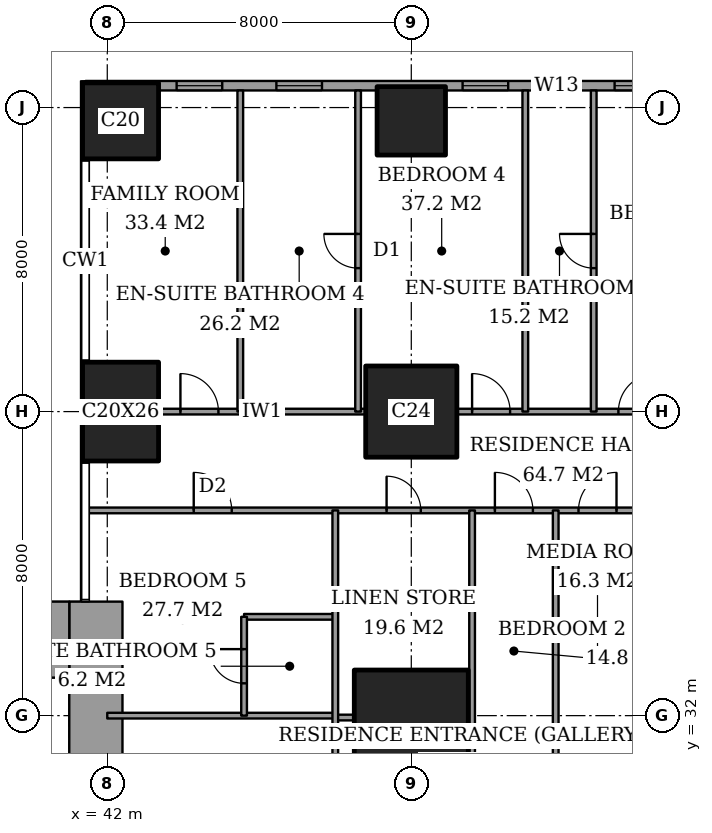
"""IFC4 building model, lengths in metres.
Left out: names, types, materials, properties, quantities, classifications, styles, units other than length and angle.
Written with IfcOpenShell. Run it as: python <this file> out.ifc"""

import sys

from ifc_helpers import new_model, si_unit, direction, frame, frame_2d, origin, origin_2d, place, context, subcontext, project, spatial, rectangle, extrude, element, fill, save


model = new_model("IFC4")
c1 = context("Model", 3, precision=1e-05, world=origin(), true_north=direction((0.0, 1.0)))
c2 = subcontext(c1, "Body", "Model", "MODEL_VIEW")
j1 = project(units=[si_unit("LENGTHUNIT", "METRE"), si_unit("PLANEANGLEUNIT", "RADIAN")], contexts=[c1])
p1 = place(None, origin())
s1 = spatial("IfcSite", under=j1, at=p1, CompositionType="ELEMENT")
p2 = place(p1, origin())
s2 = spatial("IfcBuilding", under=s1, at=p2, CompositionType="ELEMENT")
p3 = place(p2, frame((0.0, 0.0, 218.2)))
s3 = spatial("IfcBuildingStorey", under=s2, at=p3, CompositionType="ELEMENT", Elevation=218.2)
p4 = place(p3, frame((42.35, 40.0, 0.0), z_axis=(0.0, 0.0, 1.0), x_axis=(1.0, 0.0, 0.0)))
e1 = element("IfcColumn", 1, at=p4, inside=s3, PredefinedType="COLUMN", context=c2, shape_type="SweptSolid", body=[
    extrude(rectangle(XDim=2.0, YDim=2.6, at=origin_2d()), origin(), (0.0, 0.0, 1.0), 3.6),
])
p5 = place(p3, frame((42.35, 47.65, 0.0), z_axis=(0.0, 0.0, 1.0), x_axis=(1.0, 0.0, 0.0)))
e2 = element("IfcColumn", 2, at=p5, inside=s3, PredefinedType="COLUMN", context=c2, shape_type="SweptSolid", body=[
    extrude(rectangle(XDim=2.0, YDim=2.0, at=origin_2d()), origin(), (0.0, 0.0, 1.0), 3.6),
])
p6 = place(p3, frame((50.0, 32.0, 0.0), z_axis=(0.0, 0.0, 1.0), x_axis=(1.0, 0.0, 0.0)))
e3 = element("IfcColumn", 3, at=p6, inside=s3, PredefinedType="COLUMN", context=c2, shape_type="SweptSolid", body=[
    extrude(rectangle(XDim=3.0, YDim=2.4, at=origin_2d()), origin(), (0.0, 0.0, 1.0), 3.6),
])
p7 = place(p3, frame((50.0, 40.0, 0.0), z_axis=(0.0, 0.0, 1.0), x_axis=(1.0, 0.0, 0.0)))
e4 = element("IfcColumn", 4, at=p7, inside=s3, PredefinedType="COLUMN", context=c2, shape_type="SweptSolid", body=[
    extrude(rectangle(XDim=2.4, YDim=2.4, at=origin_2d()), origin(), (0.0, 0.0, 1.0), 3.6),
])
p8 = place(p3, frame((50.0, 47.65, 0.0), z_axis=(0.0, 0.0, 1.0), x_axis=(1.0, 0.0, 0.0)))
e5 = element("IfcColumn", 5, at=p8, inside=s3, PredefinedType="COLUMN", context=c2, shape_type="SweptSolid", body=[
    extrude(rectangle(XDim=1.8, YDim=1.8, at=origin_2d()), origin(), (0.0, 0.0, 1.0), 3.6),
])
p9 = place(p3, frame((37.85, 34.0, 0.0), z_axis=(0.0, 0.0, 1.0), x_axis=(1.0, 0.0, 0.0)))
e6 = element("IfcWall", 6, at=p9, inside=s3, PredefinedType="SHEAR", context=c2, shape_type="SweptSolid", body=[
    extrude(rectangle(XDim=3.15, YDim=2.0, at=frame_2d((1.575, 0.0))), origin(), (0.0, 0.0, 1.0), 3.6),
])
p10 = place(p3, frame((41.7, 24.85, 0.0), z_axis=(0.0, 0.0, 1.0), x_axis=(0.0, 1.0, 0.0)))
e7 = element("IfcWall", 7, at=p10, inside=s3, PredefinedType="SHEAR", context=c2, shape_type="SweptSolid", body=[
    extrude(rectangle(XDim=10.15, YDim=1.4, at=frame_2d((5.075, 0.0))), origin(), (0.0, 0.0, 1.0), 3.6),
])
p11 = place(p3, frame((62.825, 48.575, 0.0), z_axis=(0.0, 0.0, 1.0), x_axis=(-1.0, 0.0, 0.0)))
e8 = element("IfcWall", 8, at=p11, inside=s3, PredefinedType="SOLIDWALL", context=c2, shape_type="SweptSolid", body=[
    extrude(rectangle(XDim=21.4, YDim=0.25, at=frame_2d((10.7, 0.0))), origin(), (0.0, 0.0, 1.0), 3.6),
])
p12 = place(p11, frame((0.55, 0.0, 0.2)))
e9 = element("IfcOpeningElement", 9, at=p12, cuts=e8, PredefinedType="OPENING", context=c2, shape_type="SweptSolid", body=[
    extrude(rectangle(XDim=1.2, YDim=2.4, at=frame_2d((0.6, 1.2))), frame((0.0, 0.135, 0.0), z_axis=(0.0, -1.0, 0.0), x_axis=(1.0, 0.0, 0.0)), (0.0, 0.0, 1.0), 0.27),
])
p13 = place(p11, frame((2.475, 0.0, 0.2)))
e10 = element("IfcOpeningElement", 10, at=p13, cuts=e8, PredefinedType="OPENING", context=c2, shape_type="SweptSolid", body=[
    extrude(rectangle(XDim=1.2, YDim=2.4, at=frame_2d((0.6, 1.2))), frame((0.0, 0.135, 0.0), z_axis=(0.0, -1.0, 0.0), x_axis=(1.0, 0.0, 0.0)), (0.0, 0.0, 1.0), 0.27),
])
p14 = place(p11, frame((6.275, 0.0, 0.2)))
e11 = element("IfcOpeningElement", 11, at=p14, cuts=e8, PredefinedType="OPENING", context=c2, shape_type="SweptSolid", body=[
    extrude(rectangle(XDim=1.2, YDim=2.4, at=frame_2d((0.6, 1.2))), frame((0.0, 0.135, 0.0), z_axis=(0.0, -1.0, 0.0), x_axis=(1.0, 0.0, 0.0)), (0.0, 0.0, 1.0), 0.27),
])
p15 = place(p11, frame((8.4, 0.0, 0.2)))
e12 = element("IfcOpeningElement", 12, at=p15, cuts=e8, PredefinedType="OPENING", context=c2, shape_type="SweptSolid", body=[
    extrude(rectangle(XDim=1.2, YDim=2.4, at=frame_2d((0.6, 1.2))), frame((0.0, 0.135, 0.0), z_axis=(0.0, -1.0, 0.0), x_axis=(1.0, 0.0, 0.0)), (0.0, 0.0, 1.0), 0.27),
])
p16 = place(p11, frame((10.275, 0.0, 0.2)))
e13 = element("IfcOpeningElement", 13, at=p16, cuts=e8, PredefinedType="OPENING", context=c2, shape_type="SweptSolid", body=[
    extrude(rectangle(XDim=1.2, YDim=2.4, at=frame_2d((0.6, 1.2))), frame((0.0, 0.135, 0.0), z_axis=(0.0, -1.0, 0.0), x_axis=(1.0, 0.0, 0.0)), (0.0, 0.0, 1.0), 0.27),
])
p17 = place(p11, frame((15.175, 0.0, 0.2)))
e14 = element("IfcOpeningElement", 14, at=p17, cuts=e8, PredefinedType="OPENING", context=c2, shape_type="SweptSolid", body=[
    extrude(rectangle(XDim=1.2, YDim=2.4, at=frame_2d((0.6, 1.2))), frame((0.0, 0.135, 0.0), z_axis=(0.0, -1.0, 0.0), x_axis=(1.0, 0.0, 0.0)), (0.0, 0.0, 1.0), 0.27),
])
p18 = place(p11, frame((17.8, 0.0, 0.2)))
e15 = element("IfcOpeningElement", 15, at=p18, cuts=e8, PredefinedType="OPENING", context=c2, shape_type="SweptSolid", body=[
    extrude(rectangle(XDim=1.2, YDim=2.4, at=frame_2d((0.6, 1.2))), frame((0.0, 0.135, 0.0), z_axis=(0.0, -1.0, 0.0), x_axis=(1.0, 0.0, 0.0)), (0.0, 0.0, 1.0), 0.27),
])
p19 = place(p3, frame((48.0, 31.95, 0.0), z_axis=(0.0, 0.0, 1.0), x_axis=(1.0, 0.0, 0.0)))
e16 = element("IfcWall", 16, at=p19, inside=s3, PredefinedType="PARTITIONING", context=c2, shape_type="SweptSolid", body=[
    extrude(rectangle(XDim=0.5, YDim=0.15, at=frame_2d((0.25, 0.0))), origin(), (0.0, 0.0, 1.0), 2.634),
])
p20 = place(p3, frame((42.0, 32.0, 0.0), z_axis=(0.0, 0.0, 1.0), x_axis=(1.0, 0.0, 0.0)))
e17 = element("IfcWall", 17, at=p20, inside=s3, PredefinedType="PARTITIONING", context=c2, shape_type="SweptSolid", body=[
    extrude(rectangle(XDim=6.0, YDim=0.15, at=frame_2d((3.0, 0.0))), origin(), (0.0, 0.0, 1.0), 2.634),
])
p21 = place(p3, frame((45.6, 34.6, 0.0), z_axis=(0.0, 0.0, 1.0), x_axis=(1.0, 0.0, 0.0)))
e18 = element("IfcWall", 18, at=p21, inside=s3, PredefinedType="PARTITIONING", context=c2, shape_type="SweptSolid", body=[
    extrude(rectangle(XDim=2.4, YDim=0.15, at=frame_2d((1.2, 0.0))), origin(), (0.0, 0.0, 1.0), 3.35),
])
p22 = place(p3, frame((41.439, 37.4, 0.0), z_axis=(0.0, 0.0, 1.0), x_axis=(1.0, 0.0, 0.0)))
e19 = element("IfcWall", 19, at=p22, inside=s3, PredefinedType="PARTITIONING", context=c2, shape_type="SweptSolid", body=[
    extrude(rectangle(XDim=25.011, YDim=0.15, at=frame_2d((12.505, 0.0))), origin(), (0.0, 0.0, 1.0), 3.35),
])
p23 = place(p22, frame((10.761, 0.0, 0.0)))
e20 = element("IfcOpeningElement", 20, at=p23, cuts=e19, PredefinedType="OPENING", context=c2, shape_type="SweptSolid", body=[
    extrude(rectangle(XDim=1.0, YDim=2.1, at=frame_2d((0.5, 1.05))), frame((0.0, 0.085, 0.0), z_axis=(0.0, -1.0, 0.0), x_axis=(1.0, 0.0, 0.0)), (0.0, 0.0, 1.0), 0.17),
])
p24 = place(p22, frame((20.924, 0.0, 0.0)))
e21 = element("IfcOpeningElement", 21, at=p24, cuts=e19, PredefinedType="OPENING", context=c2, shape_type="SweptSolid", body=[
    extrude(rectangle(XDim=1.0, YDim=2.1, at=frame_2d((0.5, 1.05))), frame((0.0, 0.085, 0.0), z_axis=(0.0, -1.0, 0.0), x_axis=(1.0, 0.0, 0.0)), (0.0, 0.0, 1.0), 0.17),
])
p25 = place(p22, frame((15.749, 0.0, 0.0)))
e22 = element("IfcOpeningElement", 22, at=p25, cuts=e19, PredefinedType="OPENING", context=c2, shape_type="SweptSolid", body=[
    extrude(rectangle(XDim=0.9, YDim=2.1, at=frame_2d((0.45, 1.05))), frame((0.0, 0.085, 0.0), z_axis=(0.0, -1.0, 0.0), x_axis=(1.0, 0.0, 0.0)), (0.0, 0.0, 1.0), 0.17),
])
p26 = place(p22, frame((12.961, 0.0, 0.0)))
e23 = element("IfcOpeningElement", 23, at=p26, cuts=e19, PredefinedType="OPENING", context=c2, shape_type="SweptSolid", body=[
    extrude(rectangle(XDim=1.0, YDim=2.1, at=frame_2d((0.5, 1.05))), frame((0.0, 0.085, 0.0), z_axis=(0.0, -1.0, 0.0), x_axis=(1.0, 0.0, 0.0)), (0.0, 0.0, 1.0), 0.17),
])
p27 = place(p22, frame((7.911, 0.0, 0.0)))
e24 = element("IfcOpeningElement", 24, at=p27, cuts=e19, PredefinedType="OPENING", context=c2, shape_type="SweptSolid", body=[
    extrude(rectangle(XDim=0.9, YDim=2.1, at=frame_2d((0.45, 1.05))), frame((0.0, 0.085, 0.0), z_axis=(0.0, -1.0, 0.0), x_axis=(1.0, 0.0, 0.0)), (0.0, 0.0, 1.0), 0.17),
])
p28 = place(p22, frame((2.836, 0.0, 0.0)))
e25 = element("IfcOpeningElement", 25, at=p28, cuts=e19, PredefinedType="OPENING", context=c2, shape_type="SweptSolid", body=[
    extrude(rectangle(XDim=1.0, YDim=2.1, at=frame_2d((0.5, 1.05))), frame((0.0, 0.085, 0.0), z_axis=(0.0, -1.0, 0.0), x_axis=(1.0, 0.0, 0.0)), (0.0, 0.0, 1.0), 0.17),
])
p29 = place(p3, frame((43.35, 40.0, 0.0), z_axis=(0.0, 0.0, 1.0), x_axis=(1.0, 0.0, 0.0)))
e26 = element("IfcWall", 26, at=p29, inside=s3, PredefinedType="PARTITIONING", context=c2, shape_type="SweptSolid", body=[
    extrude(rectangle(XDim=5.45, YDim=0.15, at=frame_2d((2.725, 0.0))), origin(), (0.0, 0.0, 1.0), 3.35),
])
p30 = place(p29, frame((0.575, 0.0, 0.0)))
e27 = element("IfcOpeningElement", 27, at=p30, cuts=e26, PredefinedType="OPENING", context=c2, shape_type="SweptSolid", body=[
    extrude(rectangle(XDim=1.0, YDim=2.1, at=frame_2d((0.5, 1.05))), frame((0.0, 0.085, 0.0), z_axis=(0.0, -1.0, 0.0), x_axis=(1.0, 0.0, 0.0)), (0.0, 0.0, 1.0), 0.17),
])
p31 = place(p3, frame((51.2, 40.0, 0.0), z_axis=(0.0, 0.0, 1.0), x_axis=(1.0, 0.0, 0.0)))
e28 = element("IfcWall", 28, at=p31, inside=s3, PredefinedType="PARTITIONING", context=c2, shape_type="SweptSolid", body=[
    extrude(rectangle(XDim=5.9, YDim=0.15, at=frame_2d((2.95, 0.0))), origin(), (0.0, 0.0, 1.0), 3.35),
])
p32 = place(p31, frame((4.25, 0.0, 0.0)))
e29 = element("IfcOpeningElement", 29, at=p32, cuts=e28, PredefinedType="OPENING", context=c2, shape_type="SweptSolid", body=[
    extrude(rectangle(XDim=1.0, YDim=2.1, at=frame_2d((0.5, 1.05))), frame((0.0, 0.085, 0.0), z_axis=(0.0, -1.0, 0.0), x_axis=(1.0, 0.0, 0.0)), (0.0, 0.0, 1.0), 0.17),
])
p33 = place(p31, frame((0.4, 0.0, 0.0)))
e30 = element("IfcOpeningElement", 30, at=p33, cuts=e28, PredefinedType="OPENING", context=c2, shape_type="SweptSolid", body=[
    extrude(rectangle(XDim=1.0, YDim=2.1, at=frame_2d((0.5, 1.05))), frame((0.0, 0.085, 0.0), z_axis=(0.0, -1.0, 0.0), x_axis=(1.0, 0.0, 0.0)), (0.0, 0.0, 1.0), 0.17),
])
p34 = place(p3, frame((45.5, 40.0, 0.0), z_axis=(0.0, 0.0, 1.0), x_axis=(0.0, 1.0, 0.0)))
e31 = element("IfcWall", 31, at=p34, inside=s3, PredefinedType="PARTITIONING", context=c2, shape_type="SweptSolid", body=[
    extrude(rectangle(XDim=8.45, YDim=0.15, at=frame_2d((4.225, 0.0))), origin(), (0.0, 0.0, 1.0), 3.35),
])
p35 = place(p3, frame((45.6, 32.0, 0.0), z_axis=(0.0, 0.0, 1.0), x_axis=(0.0, 1.0, 0.0)))
e32 = element("IfcWall", 32, at=p35, inside=s3, PredefinedType="PARTITIONING", context=c2, shape_type="SweptSolid", body=[
    extrude(rectangle(XDim=2.6, YDim=0.15, at=frame_2d((1.3, 0.0))), origin(), (0.0, 0.0, 1.0), 3.35),
])
p36 = place(p35, frame((0.85, 0.0, 0.0)))
e33 = element("IfcOpeningElement", 33, at=p36, cuts=e32, PredefinedType="OPENING", context=c2, shape_type="SweptSolid", body=[
    extrude(rectangle(XDim=0.9, YDim=2.1, at=frame_2d((0.45, 1.05))), frame((0.0, 0.085, 0.0), z_axis=(0.0, -1.0, 0.0), x_axis=(1.0, 0.0, 0.0)), (0.0, 0.0, 1.0), 0.17),
])
p37 = place(p3, frame((48.0, 28.0, 0.0), z_axis=(0.0, 0.0, 1.0), x_axis=(0.0, 1.0, 0.0)))
e34 = element("IfcWall", 34, at=p37, inside=s3, PredefinedType="PARTITIONING", context=c2, shape_type="SweptSolid", body=[
    extrude(rectangle(XDim=9.4, YDim=0.15, at=frame_2d((4.7, 0.0))), origin(), (0.0, 0.0, 1.0), 3.35),
])
p38 = place(p37, frame((0.5, 0.0, 0.0)))
e35 = element("IfcOpeningElement", 35, at=p38, cuts=e34, PredefinedType="OPENING", context=c2, shape_type="SweptSolid", body=[
    extrude(rectangle(XDim=1.0, YDim=2.1, at=frame_2d((0.5, 1.05))), frame((0.0, 0.085, 0.0), z_axis=(0.0, -1.0, 0.0), x_axis=(1.0, 0.0, 0.0)), (0.0, 0.0, 1.0), 0.17),
])
p39 = place(p3, frame((48.6, 40.0, 0.0), z_axis=(0.0, 0.0, 1.0), x_axis=(0.0, 1.0, 0.0)))
e36 = element("IfcWall", 36, at=p39, inside=s3, PredefinedType="PARTITIONING", context=c2, shape_type="SweptSolid", body=[
    extrude(rectangle(XDim=8.45, YDim=0.15, at=frame_2d((4.225, 0.0))), origin(), (0.0, 0.0, 1.0), 3.35),
])
p40 = place(p39, frame((3.775, 0.0, 0.0)))
e37 = element("IfcOpeningElement", 37, at=p40, cuts=e36, PredefinedType="OPENING", context=c2, shape_type="SweptSolid", body=[
    extrude(rectangle(XDim=0.9, YDim=2.1, at=frame_2d((0.45, 1.05))), frame((0.0, 0.085, 0.0), z_axis=(0.0, -1.0, 0.0), x_axis=(1.0, 0.0, 0.0)), (0.0, 0.0, 1.0), 0.17),
])
p41 = place(p3, frame((51.6, 30.0, 0.0), z_axis=(0.0, 0.0, 1.0), x_axis=(0.0, 1.0, 0.0)))
e38 = element("IfcWall", 38, at=p41, inside=s3, PredefinedType="PARTITIONING", context=c2, shape_type="SweptSolid", body=[
    extrude(rectangle(XDim=7.4, YDim=0.15, at=frame_2d((3.7, 0.0))), origin(), (0.0, 0.0, 1.0), 3.35),
])
p42 = place(p3, frame((53.0, 40.0, 0.0), z_axis=(0.0, 0.0, 1.0), x_axis=(0.0, 1.0, 0.0)))
e39 = element("IfcWall", 39, at=p42, inside=s3, PredefinedType="PARTITIONING", context=c2, shape_type="SweptSolid", body=[
    extrude(rectangle(XDim=8.45, YDim=0.15, at=frame_2d((4.225, 0.0))), origin(), (0.0, 0.0, 1.0), 3.35),
])
p43 = place(p3, frame((53.8, 30.0, 0.0), z_axis=(0.0, 0.0, 1.0), x_axis=(0.0, 1.0, 0.0)))
e40 = element("IfcWall", 40, at=p43, inside=s3, PredefinedType="PARTITIONING", context=c2, shape_type="SweptSolid", body=[
    extrude(rectangle(XDim=7.4, YDim=0.15, at=frame_2d((3.7, 0.0))), origin(), (0.0, 0.0, 1.0), 3.35),
])
p44 = place(p3, frame((54.8, 40.0, 0.0), z_axis=(0.0, 0.0, 1.0), x_axis=(0.0, 1.0, 0.0)))
e41 = element("IfcWall", 41, at=p44, inside=s3, PredefinedType="PARTITIONING", context=c2, shape_type="SweptSolid", body=[
    extrude(rectangle(XDim=8.45, YDim=0.15, at=frame_2d((4.225, 0.0))), origin(), (0.0, 0.0, 1.0), 3.35),
])
p45 = place(p44, frame((3.775, 0.0, 0.0)))
e42 = element("IfcOpeningElement", 42, at=p45, cuts=e41, PredefinedType="OPENING", context=c2, shape_type="SweptSolid", body=[
    extrude(rectangle(XDim=0.9, YDim=2.1, at=frame_2d((0.45, 1.05))), frame((0.0, 0.085, 0.0), z_axis=(0.0, -1.0, 0.0), x_axis=(1.0, 0.0, 0.0)), (0.0, 0.0, 1.0), 0.17),
])
p46 = place(p14, origin())
e43 = element("IfcWindow", 43, at=p46, inside=s3, PartitioningType="SINGLE_PANEL", PredefinedType="WINDOW", context=c2, shape_type="SweptSolid", body=[
    extrude(rectangle(XDim=1.2, YDim=2.4, at=frame_2d((0.6, 1.2))), frame((0.0, 0.03, 0.0), z_axis=(0.0, -1.0, 0.0), x_axis=(1.0, 0.0, 0.0)), (0.0, 0.0, 1.0), 0.06),
])
fill(e11, e43)
p47 = place(p15, origin())
e44 = element("IfcWindow", 44, at=p47, inside=s3, PartitioningType="SINGLE_PANEL", PredefinedType="WINDOW", context=c2, shape_type="SweptSolid", body=[
    extrude(rectangle(XDim=1.2, YDim=2.4, at=frame_2d((0.6, 1.2))), frame((0.0, 0.03, 0.0), z_axis=(0.0, -1.0, 0.0), x_axis=(1.0, 0.0, 0.0)), (0.0, 0.0, 1.0), 0.06),
])
fill(e12, e44)
p48 = place(p16, origin())
e45 = element("IfcWindow", 45, at=p48, inside=s3, PartitioningType="SINGLE_PANEL", PredefinedType="WINDOW", context=c2, shape_type="SweptSolid", body=[
    extrude(rectangle(XDim=1.2, YDim=2.4, at=frame_2d((0.6, 1.2))), frame((0.0, 0.03, 0.0), z_axis=(0.0, -1.0, 0.0), x_axis=(1.0, 0.0, 0.0)), (0.0, 0.0, 1.0), 0.06),
])
fill(e13, e45)
p49 = place(p17, origin())
e46 = element("IfcWindow", 46, at=p49, inside=s3, PartitioningType="SINGLE_PANEL", PredefinedType="WINDOW", context=c2, shape_type="SweptSolid", body=[
    extrude(rectangle(XDim=1.2, YDim=2.4, at=frame_2d((0.6, 1.2))), frame((0.0, 0.03, 0.0), z_axis=(0.0, -1.0, 0.0), x_axis=(1.0, 0.0, 0.0)), (0.0, 0.0, 1.0), 0.06),
])
fill(e14, e46)
p50 = place(p18, origin())
e47 = element("IfcWindow", 47, at=p50, inside=s3, PartitioningType="SINGLE_PANEL", PredefinedType="WINDOW", context=c2, shape_type="SweptSolid", body=[
    extrude(rectangle(XDim=1.2, YDim=2.4, at=frame_2d((0.6, 1.2))), frame((0.0, 0.03, 0.0), z_axis=(0.0, -1.0, 0.0), x_axis=(1.0, 0.0, 0.0)), (0.0, 0.0, 1.0), 0.06),
])
fill(e15, e47)
p51 = place(p32, origin())
e48 = element("IfcDoor", 48, at=p51, inside=s3, OperationType="SINGLE_SWING_LEFT", PredefinedType="DOOR", context=c2, shape_type="SweptSolid", body=[
    extrude(rectangle(XDim=1.0, YDim=2.1, at=frame_2d((0.5, 1.05))), frame((0.0, 0.025, 0.0), z_axis=(0.0, -1.0, 0.0), x_axis=(1.0, 0.0, 0.0)), (0.0, 0.0, 1.0), 0.05),
])
fill(e29, e48)
p52 = place(p45, origin())
e49 = element("IfcDoor", 49, at=p52, inside=s3, OperationType="SINGLE_SWING_LEFT", PredefinedType="DOOR", context=c2, shape_type="SweptSolid", body=[
    extrude(rectangle(XDim=0.9, YDim=2.1, at=frame_2d((0.45, 1.05))), frame((0.0, 0.025, 0.0), z_axis=(0.0, -1.0, 0.0), x_axis=(1.0, 0.0, 0.0)), (0.0, 0.0, 1.0), 0.05),
])
fill(e42, e49)
p53 = place(p33, origin())
e50 = element("IfcDoor", 50, at=p53, inside=s3, OperationType="SINGLE_SWING_RIGHT", PredefinedType="DOOR", context=c2, shape_type="SweptSolid", body=[
    extrude(rectangle(XDim=1.0, YDim=2.1, at=frame_2d((0.5, 1.05))), frame((0.0, 0.025, 0.0), z_axis=(0.0, -1.0, 0.0), x_axis=(1.0, 0.0, 0.0)), (0.0, 0.0, 1.0), 0.05),
])
fill(e30, e50)
p54 = place(p40, origin())
e51 = element("IfcDoor", 51, at=p54, inside=s3, OperationType="SINGLE_SWING_LEFT", PredefinedType="DOOR", context=c2, shape_type="SweptSolid", body=[
    extrude(rectangle(XDim=0.9, YDim=2.1, at=frame_2d((0.45, 1.05))), frame((0.0, 0.025, 0.0), z_axis=(0.0, -1.0, 0.0), x_axis=(1.0, 0.0, 0.0)), (0.0, 0.0, 1.0), 0.05),
])
fill(e37, e51)
p55 = place(p30, origin())
e52 = element("IfcDoor", 52, at=p55, inside=s3, OperationType="SINGLE_SWING_RIGHT", PredefinedType="DOOR", context=c2, shape_type="SweptSolid", body=[
    extrude(rectangle(XDim=1.0, YDim=2.1, at=frame_2d((0.5, 1.05))), frame((0.0, 0.025, 0.0), z_axis=(0.0, -1.0, 0.0), x_axis=(1.0, 0.0, 0.0)), (0.0, 0.0, 1.0), 0.05),
])
fill(e27, e52)
p56 = place(p23, origin())
e53 = element("IfcDoor", 53, at=p56, inside=s3, OperationType="SINGLE_SWING_RIGHT", PredefinedType="DOOR", context=c2, shape_type="SweptSolid", body=[
    extrude(rectangle(XDim=1.0, YDim=2.1, at=frame_2d((0.5, 1.05))), frame((0.0, 0.025, 0.0), z_axis=(0.0, -1.0, 0.0), x_axis=(1.0, 0.0, 0.0)), (0.0, 0.0, 1.0), 0.05),
])
fill(e20, e53)
p57 = place(p26, origin())
e54 = element("IfcDoor", 54, at=p57, inside=s3, OperationType="SINGLE_SWING_LEFT", PredefinedType="DOOR", context=c2, shape_type="SweptSolid", body=[
    extrude(rectangle(XDim=1.0, YDim=2.1, at=frame_2d((0.5, 1.05))), frame((0.0, 0.025, 0.0), z_axis=(0.0, -1.0, 0.0), x_axis=(1.0, 0.0, 0.0)), (0.0, 0.0, 1.0), 0.05),
])
fill(e23, e54)
p58 = place(p27, origin())
e55 = element("IfcDoor", 55, at=p58, inside=s3, OperationType="SINGLE_SWING_RIGHT", PredefinedType="DOOR", context=c2, shape_type="SweptSolid", body=[
    extrude(rectangle(XDim=0.9, YDim=2.1, at=frame_2d((0.45, 1.05))), frame((0.0, 0.025, 0.0), z_axis=(0.0, -1.0, 0.0), x_axis=(1.0, 0.0, 0.0)), (0.0, 0.0, 1.0), 0.05),
])
fill(e24, e55)
p59 = place(p36, origin())
e56 = element("IfcDoor", 56, at=p59, inside=s3, OperationType="SINGLE_SWING_LEFT", PredefinedType="DOOR", context=c2, shape_type="SweptSolid", body=[
    extrude(rectangle(XDim=0.9, YDim=2.1, at=frame_2d((0.45, 1.05))), frame((0.0, 0.025, 0.0), z_axis=(0.0, -1.0, 0.0), x_axis=(1.0, 0.0, 0.0)), (0.0, 0.0, 1.0), 0.05),
])
fill(e33, e56)
p60 = place(p28, origin())
e57 = element("IfcDoor", 57, at=p60, inside=s3, OperationType="SINGLE_SWING_RIGHT", PredefinedType="DOOR", context=c2, shape_type="SweptSolid", body=[
    extrude(rectangle(XDim=1.0, YDim=2.1, at=frame_2d((0.5, 1.05))), frame((0.0, 0.025, 0.0), z_axis=(0.0, -1.0, 0.0), x_axis=(1.0, 0.0, 0.0)), (0.0, 0.0, 1.0), 0.05),
])
fill(e25, e57)
save(model, sys.argv[1])
